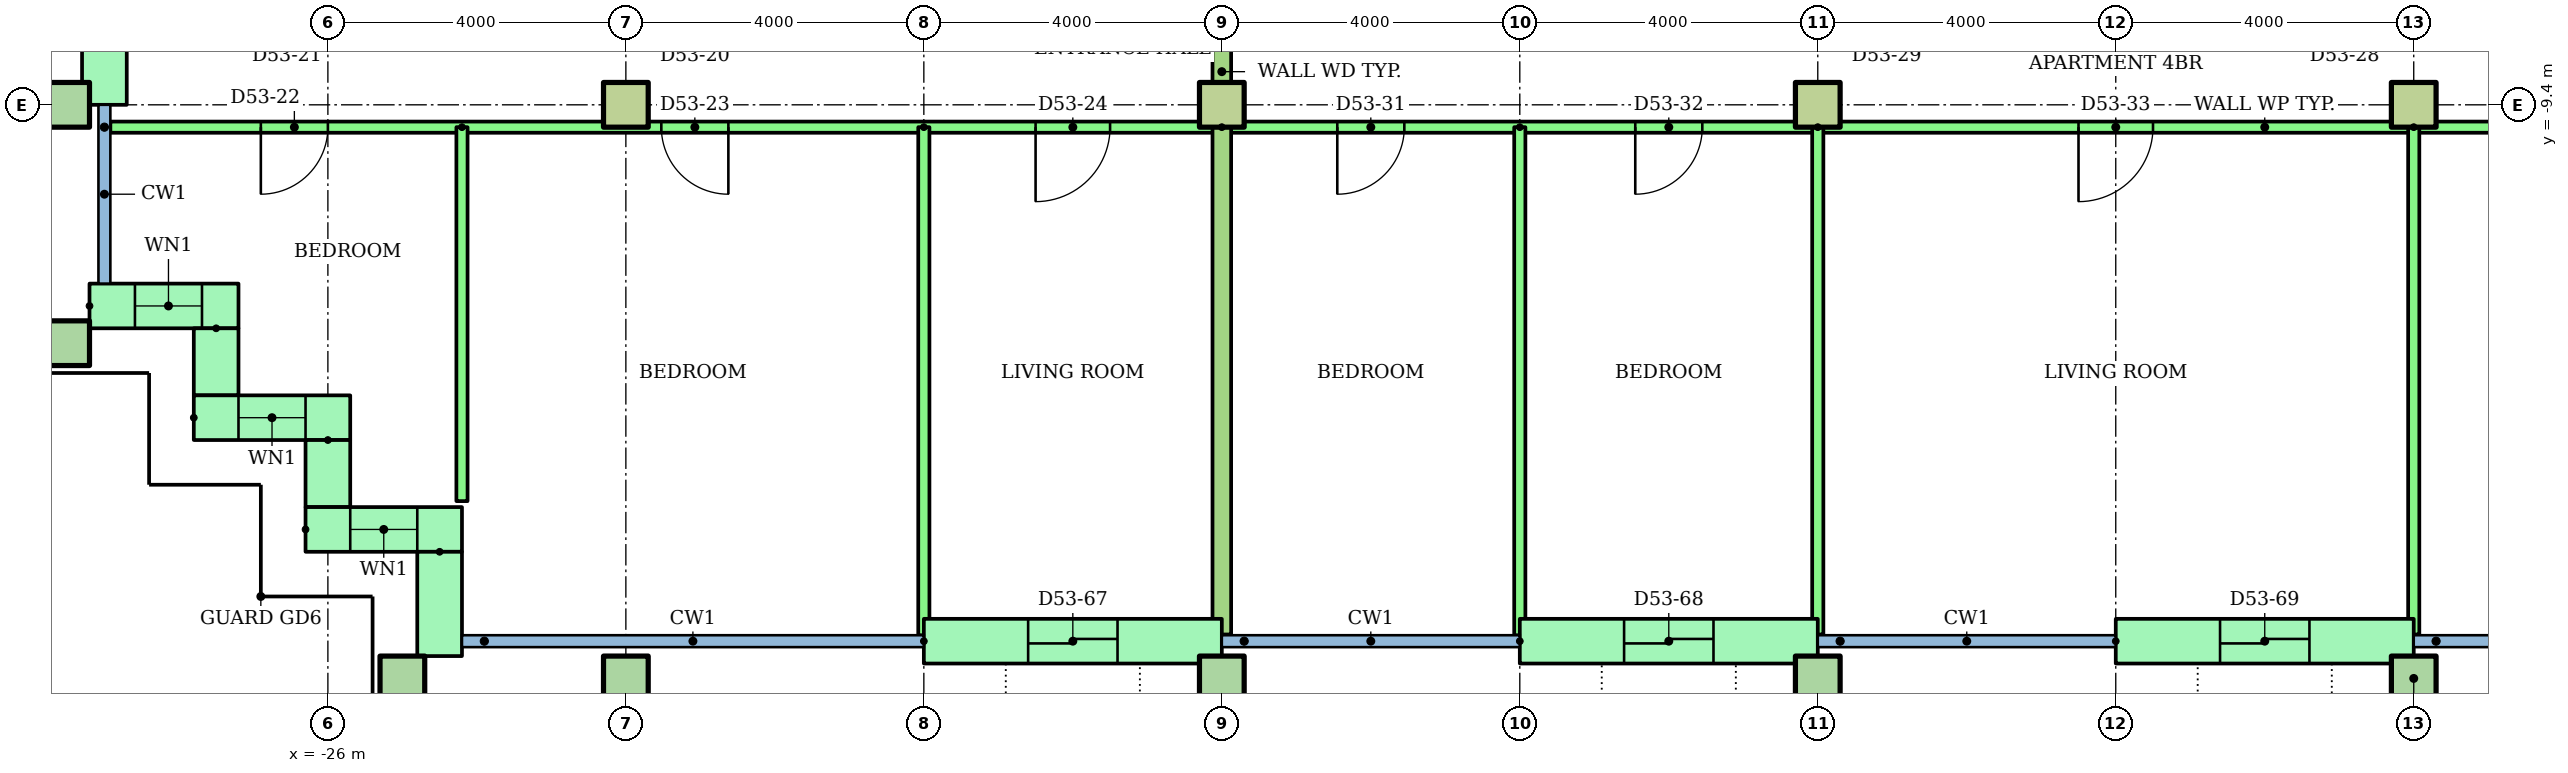
"""IFC4 building model, lengths in metres.
Left out: names, types, materials, properties, quantities, classifications, styles, units other than length and angle.
Written with IfcOpenShell. Run it as: python <this file> out.ifc"""

import sys

from ifc_helpers import new_model, si_unit, direction, frame, frame_2d, origin, origin_2d, place, context, subcontext, project, spatial, rectangle, hollow_rectangle, extrude, element, fill, save


model = new_model("IFC4")
c1 = context("Model", 3, precision=1e-05, world=origin(), true_north=direction((0.0, 1.0)))
c2 = subcontext(c1, "Body", "Model", "MODEL_VIEW")
j1 = project(units=[si_unit("LENGTHUNIT", "METRE"), si_unit("PLANEANGLEUNIT", "RADIAN")], contexts=[c1])
p1 = place(None, origin())
s1 = spatial("IfcSite", under=j1, at=p1, CompositionType="ELEMENT")
p2 = place(p1, origin())
s2 = spatial("IfcBuilding", under=s1, at=p2, CompositionType="ELEMENT")
p3 = place(p2, frame((0.0, 0.0, 207.6)))
s3 = spatial("IfcBuildingStorey", under=s2, at=p3, CompositionType="ELEMENT", Elevation=207.6)
for number, where in (
    (1, (-25.0, -17.1, 0.0)),
    (2, (-22.0, -17.1, 0.0)),
    (3, (-14.0, -17.1, 0.0)),
    (4, (-6.0, -17.1, 0.0)),
    (5, (2.0, -17.1, 0.0)),
    (6, (-29.5, -12.6, 0.0)),
    (7, (-29.5, -9.4, 0.0)),
):
    element("IfcColumn", number, at=place(p3, frame(where)), inside=s3, PredefinedType="COLUMN", context=c2, shape_type="SweptSolid", body=[
        extrude(hollow_rectangle(XDim=0.6, YDim=0.6, WallThickness=0.03, at=origin_2d()), origin(), (0.0, 0.0, 1.0), 3.2),
    ])
for number, where in (
    (8, (-22.0, -9.4, 0.0)),
    (9, (-14.0, -9.4, 0.0)),
    (10, (-6.0, -9.4, 0.0)),
    (11, (2.0, -9.4, 0.0)),
):
    element("IfcColumn", number, at=place(p3, frame(where)), inside=s3, PredefinedType="COLUMN", context=c2, shape_type="SweptSolid", body=[
        extrude(rectangle(XDim=0.6, YDim=0.6, at=origin_2d()), origin(), (0.0, 0.0, 1.0), 3.2),
    ])
p4 = place(p3, frame((-29.0, -5.7, 0.0), z_axis=(0.0, 0.0, 1.0), x_axis=(0.0, -1.0, 0.0)))
e12 = element("IfcWall", 12, at=p4, inside=s3, PredefinedType="STANDARD", context=c2, shape_type="SweptSolid", body=[
    extrude(rectangle(XDim=3.7, YDim=0.6, at=frame_2d((1.85, 0.0))), origin(), (0.0, 0.0, 1.0), 2.92),
])
p5 = place(p4, frame((1.125, 0.0, 0.0)))
e13 = element("IfcOpeningElement", 13, at=p5, cuts=e12, PredefinedType="OPENING", context=c2, shape_type="SweptSolid", body=[
    extrude(rectangle(XDim=1.2, YDim=2.1, at=frame_2d((0.6, 1.05))), frame((0.0, 0.31, 0.0), z_axis=(0.0, -1.0, 0.0), x_axis=(1.0, 0.0, 0.0)), (0.0, 0.0, 1.0), 0.62),
])
p6 = place(p3, frame((-29.2, -12.1, 0.0)))
e14 = element("IfcWall", 14, at=p6, inside=s3, PredefinedType="STANDARD", context=c2, shape_type="SweptSolid", body=[
    extrude(rectangle(XDim=2.0, YDim=0.6, at=frame_2d((1.0, 0.0))), origin(), (0.0, 0.0, 1.0), 2.92),
])
p7 = place(p6, frame((0.61, 0.0, 0.9)))
e15 = element("IfcOpeningElement", 15, at=p7, cuts=e14, PredefinedType="OPENING", context=c2, shape_type="SweptSolid", body=[
    extrude(rectangle(XDim=0.9, YDim=1.5, at=frame_2d((0.45, 0.75))), frame((0.0, 0.31, 0.0), z_axis=(0.0, -1.0, 0.0), x_axis=(1.0, 0.0, 0.0)), (0.0, 0.0, 1.0), 0.62),
])
p8 = place(p3, frame((-27.5, -12.4, 0.0), z_axis=(0.0, 0.0, 1.0), x_axis=(0.0, -1.0, 0.0)))
e16 = element("IfcWall", 16, at=p8, inside=s3, PredefinedType="STANDARD", context=c2, shape_type="SweptSolid", body=[
    extrude(rectangle(XDim=0.9, YDim=0.6, at=frame_2d((0.45, 0.0))), origin(), (0.0, 0.0, 1.0), 2.92),
])
p9 = place(p3, frame((-27.8, -13.6, 0.0)))
e17 = element("IfcWall", 17, at=p9, inside=s3, PredefinedType="STANDARD", context=c2, shape_type="SweptSolid", body=[
    extrude(rectangle(XDim=2.1, YDim=0.6, at=frame_2d((1.05, 0.0))), origin(), (0.0, 0.0, 1.0), 2.92),
])
p10 = place(p9, frame((0.6, 0.0, 0.9)))
e18 = element("IfcOpeningElement", 18, at=p10, cuts=e17, PredefinedType="OPENING", context=c2, shape_type="SweptSolid", body=[
    extrude(rectangle(XDim=0.9, YDim=1.5, at=frame_2d((0.45, 0.75))), frame((0.0, 0.31, 0.0), z_axis=(0.0, -1.0, 0.0), x_axis=(1.0, 0.0, 0.0)), (0.0, 0.0, 1.0), 0.62),
])
p11 = place(p3, frame((-26.0, -13.9, 0.0), z_axis=(0.0, 0.0, 1.0), x_axis=(0.0, -1.0, 0.0)))
e19 = element("IfcWall", 19, at=p11, inside=s3, PredefinedType="STANDARD", context=c2, shape_type="SweptSolid", body=[
    extrude(rectangle(XDim=0.9, YDim=0.6, at=frame_2d((0.45, 0.0))), origin(), (0.0, 0.0, 1.0), 2.92),
])
p12 = place(p3, frame((-26.3, -15.1, 0.0)))
e20 = element("IfcWall", 20, at=p12, inside=s3, PredefinedType="STANDARD", context=c2, shape_type="SweptSolid", body=[
    extrude(rectangle(XDim=2.1, YDim=0.6, at=frame_2d((1.05, 0.0))), origin(), (0.0, 0.0, 1.0), 2.92),
])
p13 = place(p12, frame((0.6, 0.0, 0.9)))
e21 = element("IfcOpeningElement", 21, at=p13, cuts=e20, PredefinedType="OPENING", context=c2, shape_type="SweptSolid", body=[
    extrude(rectangle(XDim=0.9, YDim=1.5, at=frame_2d((0.45, 0.75))), frame((0.0, 0.31, 0.0), z_axis=(0.0, -1.0, 0.0), x_axis=(1.0, 0.0, 0.0)), (0.0, 0.0, 1.0), 0.62),
])
p14 = place(p3, frame((-24.5, -15.4, 0.0), z_axis=(0.0, 0.0, 1.0), x_axis=(0.0, -1.0, 0.0)))
e22 = element("IfcWall", 22, at=p14, inside=s3, PredefinedType="STANDARD", context=c2, shape_type="SweptSolid", body=[
    extrude(rectangle(XDim=1.4, YDim=0.6, at=frame_2d((0.7, 0.0))), origin(), (0.0, 0.0, 1.0), 2.92),
])
p15 = place(p3, frame((-18.0, -16.6, 0.0)))
e23 = element("IfcWall", 23, at=p15, inside=s3, PredefinedType="STANDARD", context=c2, shape_type="SweptSolid", body=[
    extrude(rectangle(XDim=4.0, YDim=0.6, at=frame_2d((2.0, 0.0))), origin(), (0.0, 0.0, 1.0), 2.92),
])
p16 = place(p15, frame((1.4, 0.0, 0.0)))
e24 = element("IfcOpeningElement", 24, at=p16, cuts=e23, PredefinedType="OPENING", context=c2, shape_type="SweptSolid", body=[
    extrude(rectangle(XDim=1.2, YDim=2.1, at=frame_2d((0.6, 1.05))), frame((0.0, 0.31, 0.0), z_axis=(0.0, -1.0, 0.0), x_axis=(1.0, 0.0, 0.0)), (0.0, 0.0, 1.0), 0.62),
])
p17 = place(p3, frame((-10.0, -16.6, 0.0)))
e25 = element("IfcWall", 25, at=p17, inside=s3, PredefinedType="STANDARD", context=c2, shape_type="SweptSolid", body=[
    extrude(rectangle(XDim=4.0, YDim=0.6, at=frame_2d((2.0, 0.0))), origin(), (0.0, 0.0, 1.0), 2.92),
])
p18 = place(p17, frame((1.4, 0.0, 0.0)))
e26 = element("IfcOpeningElement", 26, at=p18, cuts=e25, PredefinedType="OPENING", context=c2, shape_type="SweptSolid", body=[
    extrude(rectangle(XDim=1.2, YDim=2.1, at=frame_2d((0.6, 1.05))), frame((0.0, 0.31, 0.0), z_axis=(0.0, -1.0, 0.0), x_axis=(1.0, 0.0, 0.0)), (0.0, 0.0, 1.0), 0.62),
])
p19 = place(p3, frame((-2.0, -16.6, 0.0)))
e27 = element("IfcWall", 27, at=p19, inside=s3, PredefinedType="STANDARD", context=c2, shape_type="SweptSolid", body=[
    extrude(rectangle(XDim=4.0, YDim=0.6, at=frame_2d((2.0, 0.0))), origin(), (0.0, 0.0, 1.0), 2.92),
])
p20 = place(p19, frame((1.4, 0.0, 0.0)))
e28 = element("IfcOpeningElement", 28, at=p20, cuts=e27, PredefinedType="OPENING", context=c2, shape_type="SweptSolid", body=[
    extrude(rectangle(XDim=1.2, YDim=2.1, at=frame_2d((0.6, 1.05))), frame((0.0, 0.31, 0.0), z_axis=(0.0, -1.0, 0.0), x_axis=(1.0, 0.0, 0.0)), (0.0, 0.0, 1.0), 0.62),
])
p21 = place(p3, frame((-14.0, -9.7, 0.0), z_axis=(0.0, 0.0, 1.0), x_axis=(-1.0, 0.0, 0.0)))
e29 = element("IfcWall", 29, at=p21, inside=s3, PredefinedType="PARTITIONING", context=c2, shape_type="SweptSolid", body=[
    extrude(rectangle(XDim=14.92, YDim=0.15, at=frame_2d((7.46, 0.0))), origin(), (0.0, 0.0, 1.0), 2.4),
])
p22 = place(p21, frame((12.0, 0.0, 0.0)))
e30 = element("IfcOpeningElement", 30, at=p22, cuts=e29, PredefinedType="OPENING", context=c2, shape_type="SweptSolid", body=[
    extrude(rectangle(XDim=0.9, YDim=2.1, at=frame_2d((0.45, 1.05))), frame((0.0, 0.085, 0.0), z_axis=(0.0, -1.0, 0.0), x_axis=(1.0, 0.0, 0.0)), (0.0, 0.0, 1.0), 0.17),
])
p23 = place(p21, frame((6.624, 0.0, 0.0)))
e31 = element("IfcOpeningElement", 31, at=p23, cuts=e29, PredefinedType="OPENING", context=c2, shape_type="SweptSolid", body=[
    extrude(rectangle(XDim=0.9, YDim=2.1, at=frame_2d((0.45, 1.05))), frame((0.0, 0.085, 0.0), z_axis=(0.0, -1.0, 0.0), x_axis=(1.0, 0.0, 0.0)), (0.0, 0.0, 1.0), 0.17),
])
p24 = place(p21, frame((1.5, 0.0, 0.0)))
e32 = element("IfcOpeningElement", 32, at=p24, cuts=e29, PredefinedType="OPENING", context=c2, shape_type="SweptSolid", body=[
    extrude(rectangle(XDim=1.0, YDim=2.1, at=frame_2d((0.5, 1.05))), frame((0.0, 0.085, 0.0), z_axis=(0.0, -1.0, 0.0), x_axis=(1.0, 0.0, 0.0)), (0.0, 0.0, 1.0), 0.17),
])
p25 = place(p3, frame((-24.2, -9.7, 0.0), z_axis=(0.0, 0.0, 1.0), x_axis=(0.0, -1.0, 0.0)))
e33 = element("IfcWall", 33, at=p25, inside=s3, PredefinedType="PARTITIONING", context=c2, shape_type="SweptSolid", body=[
    extrude(rectangle(XDim=5.02, YDim=0.15, at=frame_2d((2.51, 0.0))), origin(), (0.0, 0.0, 1.0), 2.4),
])
p26 = place(p3, frame((-18.0, -9.7, 0.0), z_axis=(0.0, 0.0, 1.0), x_axis=(0.0, -1.0, 0.0)))
e34 = element("IfcWall", 34, at=p26, inside=s3, PredefinedType="PARTITIONING", context=c2, shape_type="SweptSolid", body=[
    extrude(rectangle(XDim=6.821, YDim=0.15, at=frame_2d((3.411, 0.0))), origin(), (0.0, 0.0, 1.0), 2.4),
])
p27 = place(p3, frame((10.0, -9.7, 0.0), z_axis=(0.0, 0.0, 1.0), x_axis=(-1.0, 0.0, 0.0)))
e35 = element("IfcWall", 35, at=p27, inside=s3, PredefinedType="PARTITIONING", context=c2, shape_type="SweptSolid", body=[
    extrude(rectangle(XDim=24.0, YDim=0.15, at=frame_2d((12.0, 0.0))), origin(), (0.0, 0.0, 1.0), 2.4),
])
p28 = place(p27, frame((21.55, 0.0, 0.0)))
e36 = element("IfcOpeningElement", 36, at=p28, cuts=e35, PredefinedType="OPENING", context=c2, shape_type="SweptSolid", body=[
    extrude(rectangle(XDim=0.9, YDim=2.1, at=frame_2d((0.45, 1.05))), frame((0.0, 0.085, 0.0), z_axis=(0.0, -1.0, 0.0), x_axis=(1.0, 0.0, 0.0)), (0.0, 0.0, 1.0), 0.17),
])
p29 = place(p27, frame((17.55, 0.0, 0.0)))
e37 = element("IfcOpeningElement", 37, at=p29, cuts=e35, PredefinedType="OPENING", context=c2, shape_type="SweptSolid", body=[
    extrude(rectangle(XDim=0.9, YDim=2.1, at=frame_2d((0.45, 1.05))), frame((0.0, 0.085, 0.0), z_axis=(0.0, -1.0, 0.0), x_axis=(1.0, 0.0, 0.0)), (0.0, 0.0, 1.0), 0.17),
])
p30 = place(p27, frame((11.5, 0.0, 0.0)))
e38 = element("IfcOpeningElement", 38, at=p30, cuts=e35, PredefinedType="OPENING", context=c2, shape_type="SweptSolid", body=[
    extrude(rectangle(XDim=1.0, YDim=2.1, at=frame_2d((0.5, 1.05))), frame((0.0, 0.085, 0.0), z_axis=(0.0, -1.0, 0.0), x_axis=(1.0, 0.0, 0.0)), (0.0, 0.0, 1.0), 0.17),
])
p31 = place(p27, frame((5.55, 0.0, 0.0)))
e39 = element("IfcOpeningElement", 39, at=p31, cuts=e35, PredefinedType="OPENING", context=c2, shape_type="SweptSolid", body=[
    extrude(rectangle(XDim=0.9, YDim=2.1, at=frame_2d((0.45, 1.05))), frame((0.0, 0.085, 0.0), z_axis=(0.0, -1.0, 0.0), x_axis=(1.0, 0.0, 0.0)), (0.0, 0.0, 1.0), 0.17),
])
p32 = place(p27, frame((1.55, 0.0, 0.0)))
e40 = element("IfcOpeningElement", 40, at=p32, cuts=e35, PredefinedType="OPENING", context=c2, shape_type="SweptSolid", body=[
    extrude(rectangle(XDim=0.9, YDim=2.1, at=frame_2d((0.45, 1.05))), frame((0.0, 0.085, 0.0), z_axis=(0.0, -1.0, 0.0), x_axis=(1.0, 0.0, 0.0)), (0.0, 0.0, 1.0), 0.17),
])
p33 = place(p3, frame((-10.0, -9.7, 0.0), z_axis=(0.0, 0.0, 1.0), x_axis=(0.0, -1.0, 0.0)))
e41 = element("IfcWall", 41, at=p33, inside=s3, PredefinedType="PARTITIONING", context=c2, shape_type="SweptSolid", body=[
    extrude(rectangle(XDim=6.821, YDim=0.15, at=frame_2d((3.411, 0.0))), origin(), (0.0, 0.0, 1.0), 2.4),
])
for number, where, z_axis, x_axis in (
    (42, (-6.0, -9.7, 0.0), (0.0, 0.0, 1.0), (0.0, -1.0, 0.0)),
    (43, (2.0, -9.7, 0.0), (0.0, 0.0, 1.0), (0.0, -1.0, 0.0)),
):
    element("IfcWall", number, at=place(p3, frame(where, z_axis=z_axis, x_axis=x_axis)), inside=s3, PredefinedType="PARTITIONING", context=c2, shape_type="SweptSolid", body=[
        extrude(rectangle(XDim=6.81, YDim=0.15, at=frame_2d((3.405, 0.0))), origin(), (0.0, 0.0, 1.0), 2.4),
    ])
p34 = place(p3, frame((-14.0, -1.4, 0.0), z_axis=(0.0, 0.0, 1.0), x_axis=(0.0, -1.0, 0.0)))
e44 = element("IfcWall", 44, at=p34, inside=s3, PredefinedType="PARTITIONING", context=c2, shape_type="SweptSolid", body=[
    extrude(rectangle(XDim=15.11, YDim=0.25, at=frame_2d((7.555, 0.0))), origin(), (0.0, 0.0, 1.0), 2.4),
])
p35 = place(p7, origin())
e45 = element("IfcWindow", 45, at=p35, inside=s3, PartitioningType="SINGLE_PANEL", PredefinedType="WINDOW", context=c2, shape_type="SweptSolid", body=[
    extrude(rectangle(XDim=0.9, YDim=1.5, at=frame_2d((0.45, 0.75))), frame((0.0, 0.03, 0.0), z_axis=(0.0, -1.0, 0.0), x_axis=(1.0, 0.0, 0.0)), (0.0, 0.0, 1.0), 0.06),
])
fill(e15, e45)
p36 = place(p10, origin())
e46 = element("IfcWindow", 46, at=p36, inside=s3, PartitioningType="SINGLE_PANEL", PredefinedType="WINDOW", context=c2, shape_type="SweptSolid", body=[
    extrude(rectangle(XDim=0.9, YDim=1.5, at=frame_2d((0.45, 0.75))), frame((0.0, 0.03, 0.0), z_axis=(0.0, -1.0, 0.0), x_axis=(1.0, 0.0, 0.0)), (0.0, 0.0, 1.0), 0.06),
])
fill(e18, e46)
p37 = place(p13, origin())
e47 = element("IfcWindow", 47, at=p37, inside=s3, PartitioningType="SINGLE_PANEL", PredefinedType="WINDOW", context=c2, shape_type="SweptSolid", body=[
    extrude(rectangle(XDim=0.9, YDim=1.5, at=frame_2d((0.45, 0.75))), frame((0.0, 0.03, 0.0), z_axis=(0.0, -1.0, 0.0), x_axis=(1.0, 0.0, 0.0)), (0.0, 0.0, 1.0), 0.06),
])
fill(e21, e47)
p38 = place(p22, origin())
e48 = element("IfcDoor", 48, at=p38, inside=s3, OperationType="SINGLE_SWING_RIGHT", PredefinedType="DOOR", context=c2, shape_type="SweptSolid", body=[
    extrude(rectangle(XDim=0.9, YDim=2.1, at=frame_2d((0.45, 1.05))), frame((0.0, 0.025, 0.0), z_axis=(0.0, -1.0, 0.0), x_axis=(1.0, 0.0, 0.0)), (0.0, 0.0, 1.0), 0.05),
])
fill(e30, e48)
p39 = place(p23, origin())
e49 = element("IfcDoor", 49, at=p39, inside=s3, OperationType="SINGLE_SWING_LEFT", PredefinedType="DOOR", context=c2, shape_type="SweptSolid", body=[
    extrude(rectangle(XDim=0.9, YDim=2.1, at=frame_2d((0.45, 1.05))), frame((0.0, 0.025, 0.0), z_axis=(0.0, -1.0, 0.0), x_axis=(1.0, 0.0, 0.0)), (0.0, 0.0, 1.0), 0.05),
])
fill(e31, e49)
p40 = place(p24, origin())
e50 = element("IfcDoor", 50, at=p40, inside=s3, OperationType="SINGLE_SWING_RIGHT", PredefinedType="DOOR", context=c2, shape_type="SweptSolid", body=[
    extrude(rectangle(XDim=1.0, YDim=2.1, at=frame_2d((0.5, 1.05))), frame((0.0, 0.025, 0.0), z_axis=(0.0, -1.0, 0.0), x_axis=(1.0, 0.0, 0.0)), (0.0, 0.0, 1.0), 0.05),
])
fill(e32, e50)
p41 = place(p28, origin())
e51 = element("IfcDoor", 51, at=p41, inside=s3, OperationType="SINGLE_SWING_RIGHT", PredefinedType="DOOR", context=c2, shape_type="SweptSolid", body=[
    extrude(rectangle(XDim=0.9, YDim=2.1, at=frame_2d((0.45, 1.05))), frame((0.0, 0.025, 0.0), z_axis=(0.0, -1.0, 0.0), x_axis=(1.0, 0.0, 0.0)), (0.0, 0.0, 1.0), 0.05),
])
fill(e36, e51)
p42 = place(p29, origin())
e52 = element("IfcDoor", 52, at=p42, inside=s3, OperationType="SINGLE_SWING_RIGHT", PredefinedType="DOOR", context=c2, shape_type="SweptSolid", body=[
    extrude(rectangle(XDim=0.9, YDim=2.1, at=frame_2d((0.45, 1.05))), frame((0.0, 0.025, 0.0), z_axis=(0.0, -1.0, 0.0), x_axis=(1.0, 0.0, 0.0)), (0.0, 0.0, 1.0), 0.05),
])
fill(e37, e52)
p43 = place(p30, origin())
e53 = element("IfcDoor", 53, at=p43, inside=s3, OperationType="SINGLE_SWING_RIGHT", PredefinedType="DOOR", context=c2, shape_type="SweptSolid", body=[
    extrude(rectangle(XDim=1.0, YDim=2.1, at=frame_2d((0.5, 1.05))), frame((0.0, 0.025, 0.0), z_axis=(0.0, -1.0, 0.0), x_axis=(1.0, 0.0, 0.0)), (0.0, 0.0, 1.0), 0.05),
])
fill(e38, e53)
p44 = place(p16, origin())
e54 = element("IfcDoor", 54, at=p44, inside=s3, OperationType="SLIDING_TO_LEFT", PredefinedType="DOOR", context=c2, shape_type="SweptSolid", body=[
    extrude(rectangle(XDim=1.2, YDim=2.1, at=frame_2d((0.6, 1.05))), frame((0.0, 0.025, 0.0), z_axis=(0.0, -1.0, 0.0), x_axis=(1.0, 0.0, 0.0)), (0.0, 0.0, 1.0), 0.05),
])
fill(e24, e54)
p45 = place(p18, origin())
e55 = element("IfcDoor", 55, at=p45, inside=s3, OperationType="SLIDING_TO_LEFT", PredefinedType="DOOR", context=c2, shape_type="SweptSolid", body=[
    extrude(rectangle(XDim=1.2, YDim=2.1, at=frame_2d((0.6, 1.05))), frame((0.0, 0.025, 0.0), z_axis=(0.0, -1.0, 0.0), x_axis=(1.0, 0.0, 0.0)), (0.0, 0.0, 1.0), 0.05),
])
fill(e26, e55)
p46 = place(p20, origin())
e56 = element("IfcDoor", 56, at=p46, inside=s3, OperationType="SLIDING_TO_LEFT", PredefinedType="DOOR", context=c2, shape_type="SweptSolid", body=[
    extrude(rectangle(XDim=1.2, YDim=2.1, at=frame_2d((0.6, 1.05))), frame((0.0, 0.025, 0.0), z_axis=(0.0, -1.0, 0.0), x_axis=(1.0, 0.0, 0.0)), (0.0, 0.0, 1.0), 0.05),
])
fill(e28, e56)
save(model, sys.argv[1])
